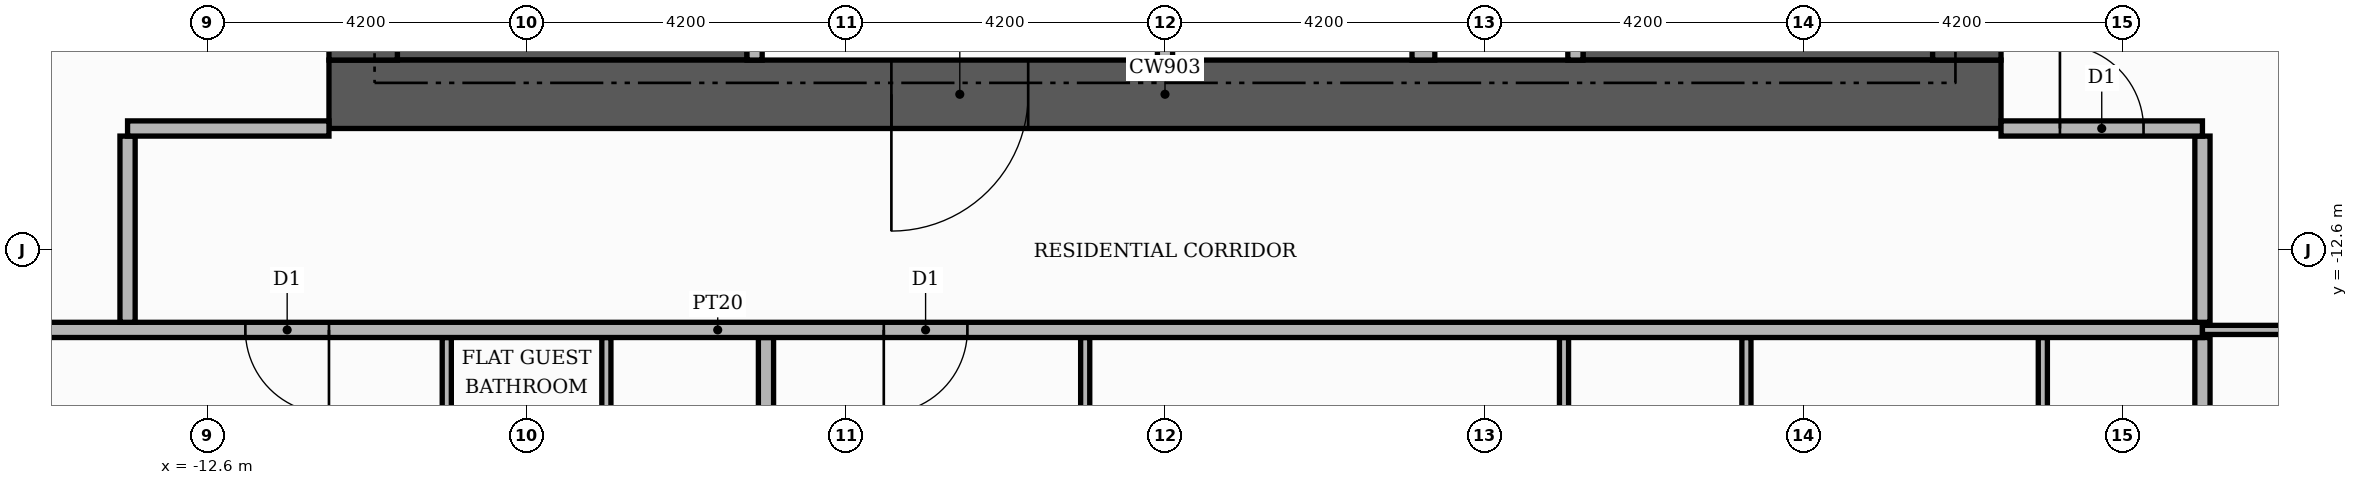
"""IFC4 building model, lengths in metres.
Left out: names, types, materials, properties, quantities, classifications, styles, units other than length and angle.
Written with IfcOpenShell. Run it as: python <this file> out.ifc"""

import sys

from ifc_helpers import new_model, si_unit, direction, frame, frame_2d, origin, place, context, subcontext, project, spatial, rectangle, extrude, element, fill, save


model = new_model("IFC4")
c1 = context("Model", 3, precision=1e-05, world=origin(), true_north=direction((0.0, 1.0)))
c2 = subcontext(c1, "Body", "Model", "MODEL_VIEW")
j1 = project(units=[si_unit("LENGTHUNIT", "METRE"), si_unit("PLANEANGLEUNIT", "RADIAN")], contexts=[c1])
p1 = place(None, origin())
s1 = spatial("IfcSite", under=j1, at=p1, CompositionType="ELEMENT")
p2 = place(p1, origin())
s2 = spatial("IfcBuilding", under=s1, at=p2, CompositionType="ELEMENT")
p3 = place(p2, frame((0.0, 0.0, 161.1)))
s3 = spatial("IfcBuildingStorey", under=s2, at=p3, CompositionType="ELEMENT", Elevation=161.1)
for number, where, z_axis, x_axis in (
    (1, (-10.1, -9.15, 0.0), (0.0, 0.0, 1.0), (1.0, 0.0, 0.0)),
    (2, (5.5, -9.15, 0.0), (0.0, 0.0, 1.0), (1.0, 0.0, 0.0)),
):
    element("IfcWall", number, at=place(p3, frame(where, z_axis=z_axis, x_axis=x_axis)), inside=s3, PredefinedType="SHEAR", context=c2, shape_type="SweptSolid", body=[
        extrude(rectangle(XDim=4.6, YDim=1.9, at=frame_2d((2.3, 0.0))), origin(), (0.0, 0.0, 1.0), 3.48),
    ])
p4 = place(p3, frame((-11.0, -10.55, 0.0), z_axis=(0.0, 0.0, 1.0), x_axis=(1.0, 0.0, 0.0)))
e3 = element("IfcWall", 3, at=p4, inside=s3, PredefinedType="SHEAR", context=c2, shape_type="SweptSolid", body=[
    extrude(rectangle(XDim=22.0, YDim=0.9, at=frame_2d((11.0, 0.0))), origin(), (0.0, 0.0, 1.0), 3.48),
])
p5 = place(p4, frame((7.4, 0.0, 0.0)))
e4 = element("IfcOpeningElement", 4, at=p5, cuts=e3, PredefinedType="OPENING", context=c2, shape_type="SweptSolid", body=[
    extrude(rectangle(XDim=1.8, YDim=2.2, at=frame_2d((0.9, 1.1))), frame((0.0, 0.46, 0.0), z_axis=(0.0, -1.0, 0.0), x_axis=(1.0, 0.0, 0.0)), (0.0, 0.0, 1.0), 0.92),
])
for number, where, z_axis, x_axis in (
    (5, (-10.55, -10.1, 0.0), (0.0, 0.0, 1.0), (0.0, 1.0, 0.0)),
    (6, (10.55, -10.1, 0.0), (0.0, 0.0, 1.0), (0.0, 1.0, 0.0)),
):
    element("IfcWall", number, at=place(p3, frame(where, z_axis=z_axis, x_axis=x_axis)), inside=s3, PredefinedType="SHEAR", context=c2, shape_type="SweptSolid", body=[
        extrude(rectangle(XDim=20.2, YDim=0.9, at=frame_2d((10.1, 0.0))), origin(), (0.0, 0.0, 1.0), 3.48),
    ])
p6 = place(p3, frame((-5.4, -10.1, 0.0), z_axis=(0.0, 0.0, 1.0), x_axis=(0.0, 1.0, 0.0)))
e7 = element("IfcWall", 7, at=p6, inside=s3, PredefinedType="PARTITIONING", context=c2, shape_type="SweptSolid", body=[
    extrude(rectangle(XDim=4.6, YDim=0.2, at=frame_2d((2.3, 0.0))), origin(), (0.0, 0.0, 1.0), 3.48),
])
p7 = place(p6, frame((2.9, 0.0, 0.0)))
e8 = element("IfcOpeningElement", 8, at=p7, cuts=e7, PredefinedType="OPENING", context=c2, shape_type="SweptSolid", body=[
    extrude(rectangle(XDim=1.0, YDim=2.1, at=frame_2d((0.5, 1.05))), frame((0.0, 0.11, 0.0), z_axis=(0.0, -1.0, 0.0), x_axis=(1.0, 0.0, 0.0)), (0.0, 0.0, 1.0), 0.22),
])
p8 = place(p3, frame((0.0, -10.1, 0.0), z_axis=(0.0, 0.0, 1.0), x_axis=(0.0, 1.0, 0.0)))
e9 = element("IfcWall", 9, at=p8, inside=s3, PredefinedType="PARTITIONING", context=c2, shape_type="SweptSolid", body=[
    extrude(rectangle(XDim=2.2, YDim=0.2, at=frame_2d((1.1, 0.0))), origin(), (0.0, 0.0, 1.0), 3.48),
])
p9 = place(p3, frame((3.4, -10.1, 0.0), z_axis=(0.0, 0.0, 1.0), x_axis=(0.0, 1.0, 0.0)))
e10 = element("IfcWall", 10, at=p9, inside=s3, PredefinedType="PARTITIONING", context=c2, shape_type="SweptSolid", body=[
    extrude(rectangle(XDim=2.2, YDim=0.3, at=frame_2d((1.1, 0.0))), origin(), (0.0, 0.0, 1.0), 3.48),
])
p10 = place(p3, frame((5.4, -10.1, 0.0), z_axis=(0.0, 0.0, 1.0), x_axis=(0.0, 1.0, 0.0)))
e11 = element("IfcWall", 11, at=p10, inside=s3, PredefinedType="PARTITIONING", context=c2, shape_type="SweptSolid", body=[
    extrude(rectangle(XDim=4.6, YDim=0.2, at=frame_2d((2.3, 0.0))), origin(), (0.0, 0.0, 1.0), 3.48),
])
p11 = place(p10, frame((2.9, 0.0, 0.0)))
e12 = element("IfcOpeningElement", 12, at=p11, cuts=e11, PredefinedType="OPENING", context=c2, shape_type="SweptSolid", body=[
    extrude(rectangle(XDim=1.0, YDim=2.1, at=frame_2d((0.5, 1.05))), frame((0.0, 0.11, 0.0), z_axis=(0.0, -1.0, 0.0), x_axis=(1.0, 0.0, 0.0)), (0.0, 0.0, 1.0), 0.22),
])
for number, where, z_axis, x_axis in (
    (13, (-5.25, -25.42, 0.0), (0.0, 0.0, 1.0), (0.0, 1.0, 0.0)),
    (14, (13.65, -25.42, 0.0), (0.0, 0.0, 1.0), (0.0, 1.0, 0.0)),
):
    element("IfcWall", number, at=place(p3, frame(where, z_axis=z_axis, x_axis=x_axis)), inside=s3, PredefinedType="PARTITIONING", context=c2, shape_type="SweptSolid", body=[
        extrude(rectangle(XDim=11.67, YDim=0.2, at=frame_2d((5.835, 0.0))), origin(), (0.0, 0.0, 1.0), 3.48),
    ])
for number, where, z_axis, x_axis in (
    (15, (-1.05, -18.86, 0.0), (0.0, 0.0, 1.0), (0.0, 1.0, 0.0)),
    (16, (5.25, -18.86, 0.0), (0.0, 0.0, 1.0), (0.0, 1.0, 0.0)),
    (17, (7.65, -18.86, 0.0), (0.0, 0.0, 1.0), (0.0, 1.0, 0.0)),
    (18, (11.55, -18.86, 0.0), (0.0, 0.0, 1.0), (0.0, 1.0, 0.0)),
):
    element("IfcWall", number, at=place(p3, frame(where, z_axis=z_axis, x_axis=x_axis)), inside=s3, PredefinedType="PARTITIONING", context=c2, shape_type="SweptSolid", body=[
        extrude(rectangle(XDim=5.11, YDim=0.12, at=frame_2d((2.555, 0.0))), origin(), (0.0, 0.0, 1.0), 3.48),
    ])
p12 = place(p3, frame((-9.45, -18.56, 0.0), z_axis=(0.0, 0.0, 1.0), x_axis=(0.0, 1.0, 0.0)))
e19 = element("IfcWall", 19, at=p12, inside=s3, PredefinedType="PARTITIONING", context=c2, shape_type="SweptSolid", body=[
    extrude(rectangle(XDim=4.81, YDim=0.12, at=frame_2d((2.405, 0.0))), origin(), (0.0, 0.0, 1.0), 3.48),
])
p13 = place(p12, frame((1.975, 0.0, 0.0)))
e20 = element("IfcOpeningElement", 20, at=p13, cuts=e19, PredefinedType="OPENING", context=c2, shape_type="SweptSolid", body=[
    extrude(rectangle(XDim=0.9, YDim=2.1, at=frame_2d((0.45, 1.05))), frame((0.0, 0.07, 0.0), z_axis=(0.0, -1.0, 0.0), x_axis=(1.0, 0.0, 0.0)), (0.0, 0.0, 1.0), 0.14),
])
p14 = place(p3, frame((-7.35, -18.56, 0.0), z_axis=(0.0, 0.0, 1.0), x_axis=(0.0, 1.0, 0.0)))
e21 = element("IfcWall", 21, at=p14, inside=s3, PredefinedType="PARTITIONING", context=c2, shape_type="SweptSolid", body=[
    extrude(rectangle(XDim=4.81, YDim=0.12, at=frame_2d((2.405, 0.0))), origin(), (0.0, 0.0, 1.0), 3.48),
])
p15 = place(p3, frame((-25.42, -13.65, 0.0), z_axis=(0.0, 0.0, 1.0), x_axis=(1.0, 0.0, 0.0)))
e22 = element("IfcWall", 22, at=p15, inside=s3, PredefinedType="PARTITIONING", context=c2, shape_type="SweptSolid", body=[
    extrude(rectangle(XDim=39.07, YDim=0.2, at=frame_2d((19.535, 0.0))), origin(), (0.0, 0.0, 1.0), 3.48),
])
p16 = place(p15, frame((13.32, 0.0, 0.0)))
e23 = element("IfcOpeningElement", 23, at=p16, cuts=e22, PredefinedType="OPENING", context=c2, shape_type="SweptSolid", body=[
    extrude(rectangle(XDim=1.1, YDim=2.4, at=frame_2d((0.55, 1.2))), frame((0.0, 0.11, 0.0), z_axis=(0.0, -1.0, 0.0), x_axis=(1.0, 0.0, 0.0)), (0.0, 0.0, 1.0), 0.22),
])
p17 = place(p15, frame((21.72, 0.0, 0.0)))
e24 = element("IfcOpeningElement", 24, at=p17, cuts=e22, PredefinedType="OPENING", context=c2, shape_type="SweptSolid", body=[
    extrude(rectangle(XDim=1.1, YDim=2.4, at=frame_2d((0.55, 1.2))), frame((0.0, 0.11, 0.0), z_axis=(0.0, -1.0, 0.0), x_axis=(1.0, 0.0, 0.0)), (0.0, 0.0, 1.0), 0.22),
])
p18 = place(p3, frame((13.65, -13.65, 0.0), z_axis=(0.0, 0.0, 1.0), x_axis=(1.0, 0.0, 0.0)))
e25 = element("IfcWall", 25, at=p18, inside=s3, PredefinedType="PARTITIONING", context=c2, shape_type="SweptSolid", body=[
    extrude(rectangle(XDim=6.47, YDim=0.12, at=frame_2d((3.235, 0.0))), origin(), (0.0, 0.0, 1.0), 3.48),
])
p19 = place(p18, frame((2.785, 0.0, 0.0)))
e26 = element("IfcOpeningElement", 26, at=p19, cuts=e25, PredefinedType="OPENING", context=c2, shape_type="SweptSolid", body=[
    extrude(rectangle(XDim=0.9, YDim=2.1, at=frame_2d((0.45, 1.05))), frame((0.0, 0.07, 0.0), z_axis=(0.0, -1.0, 0.0), x_axis=(1.0, 0.0, 0.0)), (0.0, 0.0, 1.0), 0.14),
])
for number, where, z_axis, x_axis in (
    (27, (-13.65, -13.55, 0.0), (0.0, 0.0, 1.0), (0.0, 1.0, 0.0)),
    (28, (13.65, -13.55, 0.0), (0.0, 0.0, 1.0), (0.0, 1.0, 0.0)),
):
    element("IfcWall", number, at=place(p3, frame(where, z_axis=z_axis, x_axis=x_axis)), inside=s3, PredefinedType="PARTITIONING", context=c2, shape_type="SweptSolid", body=[
        extrude(rectangle(XDim=2.45, YDim=0.2, at=frame_2d((1.225, 0.0))), origin(), (0.0, 0.0, 1.0), 3.48),
    ])
p20 = place(p3, frame((-13.65, -11.0, 0.0), z_axis=(0.0, 0.0, 1.0), x_axis=(1.0, 0.0, 0.0)))
e29 = element("IfcWall", 29, at=p20, inside=s3, PredefinedType="PARTITIONING", context=c2, shape_type="SweptSolid", body=[
    extrude(rectangle(XDim=2.65, YDim=0.2, at=frame_2d((1.325, 0.0))), origin(), (0.0, 0.0, 1.0), 3.48),
])
p21 = place(p3, frame((11.0, -11.0, 0.0), z_axis=(0.0, 0.0, 1.0), x_axis=(1.0, 0.0, 0.0)))
e30 = element("IfcWall", 30, at=p21, inside=s3, PredefinedType="PARTITIONING", context=c2, shape_type="SweptSolid", body=[
    extrude(rectangle(XDim=2.65, YDim=0.2, at=frame_2d((1.325, 0.0))), origin(), (0.0, 0.0, 1.0), 3.48),
])
p22 = place(p21, frame((0.775, 0.0, 0.0)))
e31 = element("IfcOpeningElement", 31, at=p22, cuts=e30, PredefinedType="OPENING", context=c2, shape_type="SweptSolid", body=[
    extrude(rectangle(XDim=1.1, YDim=2.4, at=frame_2d((0.55, 1.2))), frame((0.0, 0.11, 0.0), z_axis=(0.0, -1.0, 0.0), x_axis=(1.0, 0.0, 0.0)), (0.0, 0.0, 1.0), 0.22),
])
p23 = place(p5, frame((1.8, 0.0, 0.0), z_axis=(0.0, 0.0, 1.0), x_axis=(-1.0, 0.0, 0.0)))
e32 = element("IfcDoor", 32, at=p23, inside=s3, OperationType="DOUBLE_DOOR_SINGLE_SWING", PredefinedType="DOOR", context=c2, shape_type="SweptSolid", body=[
    extrude(rectangle(XDim=1.8, YDim=2.2, at=frame_2d((0.9, 1.1))), frame((0.0, 0.025, 0.0), z_axis=(0.0, -1.0, 0.0), x_axis=(1.0, 0.0, 0.0)), (0.0, 0.0, 1.0), 0.05),
])
fill(e4, e32)
p24 = place(p16, frame((1.1, 0.0, 0.0), z_axis=(0.0, 0.0, 1.0), x_axis=(-1.0, 0.0, 0.0)))
e33 = element("IfcDoor", 33, at=p24, inside=s3, OperationType="SINGLE_SWING_RIGHT", PredefinedType="DOOR", context=c2, shape_type="SweptSolid", body=[
    extrude(rectangle(XDim=1.1, YDim=2.4, at=frame_2d((0.55, 1.2))), frame((0.0, 0.025, 0.0), z_axis=(0.0, -1.0, 0.0), x_axis=(1.0, 0.0, 0.0)), (0.0, 0.0, 1.0), 0.05),
])
fill(e23, e33)
p25 = place(p17, frame((1.1, 0.0, 0.0), z_axis=(0.0, 0.0, 1.0), x_axis=(-1.0, 0.0, 0.0)))
e34 = element("IfcDoor", 34, at=p25, inside=s3, OperationType="SINGLE_SWING_LEFT", PredefinedType="DOOR", context=c2, shape_type="SweptSolid", body=[
    extrude(rectangle(XDim=1.1, YDim=2.4, at=frame_2d((0.55, 1.2))), frame((0.0, 0.025, 0.0), z_axis=(0.0, -1.0, 0.0), x_axis=(1.0, 0.0, 0.0)), (0.0, 0.0, 1.0), 0.05),
])
fill(e24, e34)
p26 = place(p22, origin())
e35 = element("IfcDoor", 35, at=p26, inside=s3, OperationType="SINGLE_SWING_LEFT", PredefinedType="DOOR", context=c2, shape_type="SweptSolid", body=[
    extrude(rectangle(XDim=1.1, YDim=2.4, at=frame_2d((0.55, 1.2))), frame((0.0, 0.025, 0.0), z_axis=(0.0, -1.0, 0.0), x_axis=(1.0, 0.0, 0.0)), (0.0, 0.0, 1.0), 0.05),
])
fill(e31, e35)
save(model, sys.argv[1])
